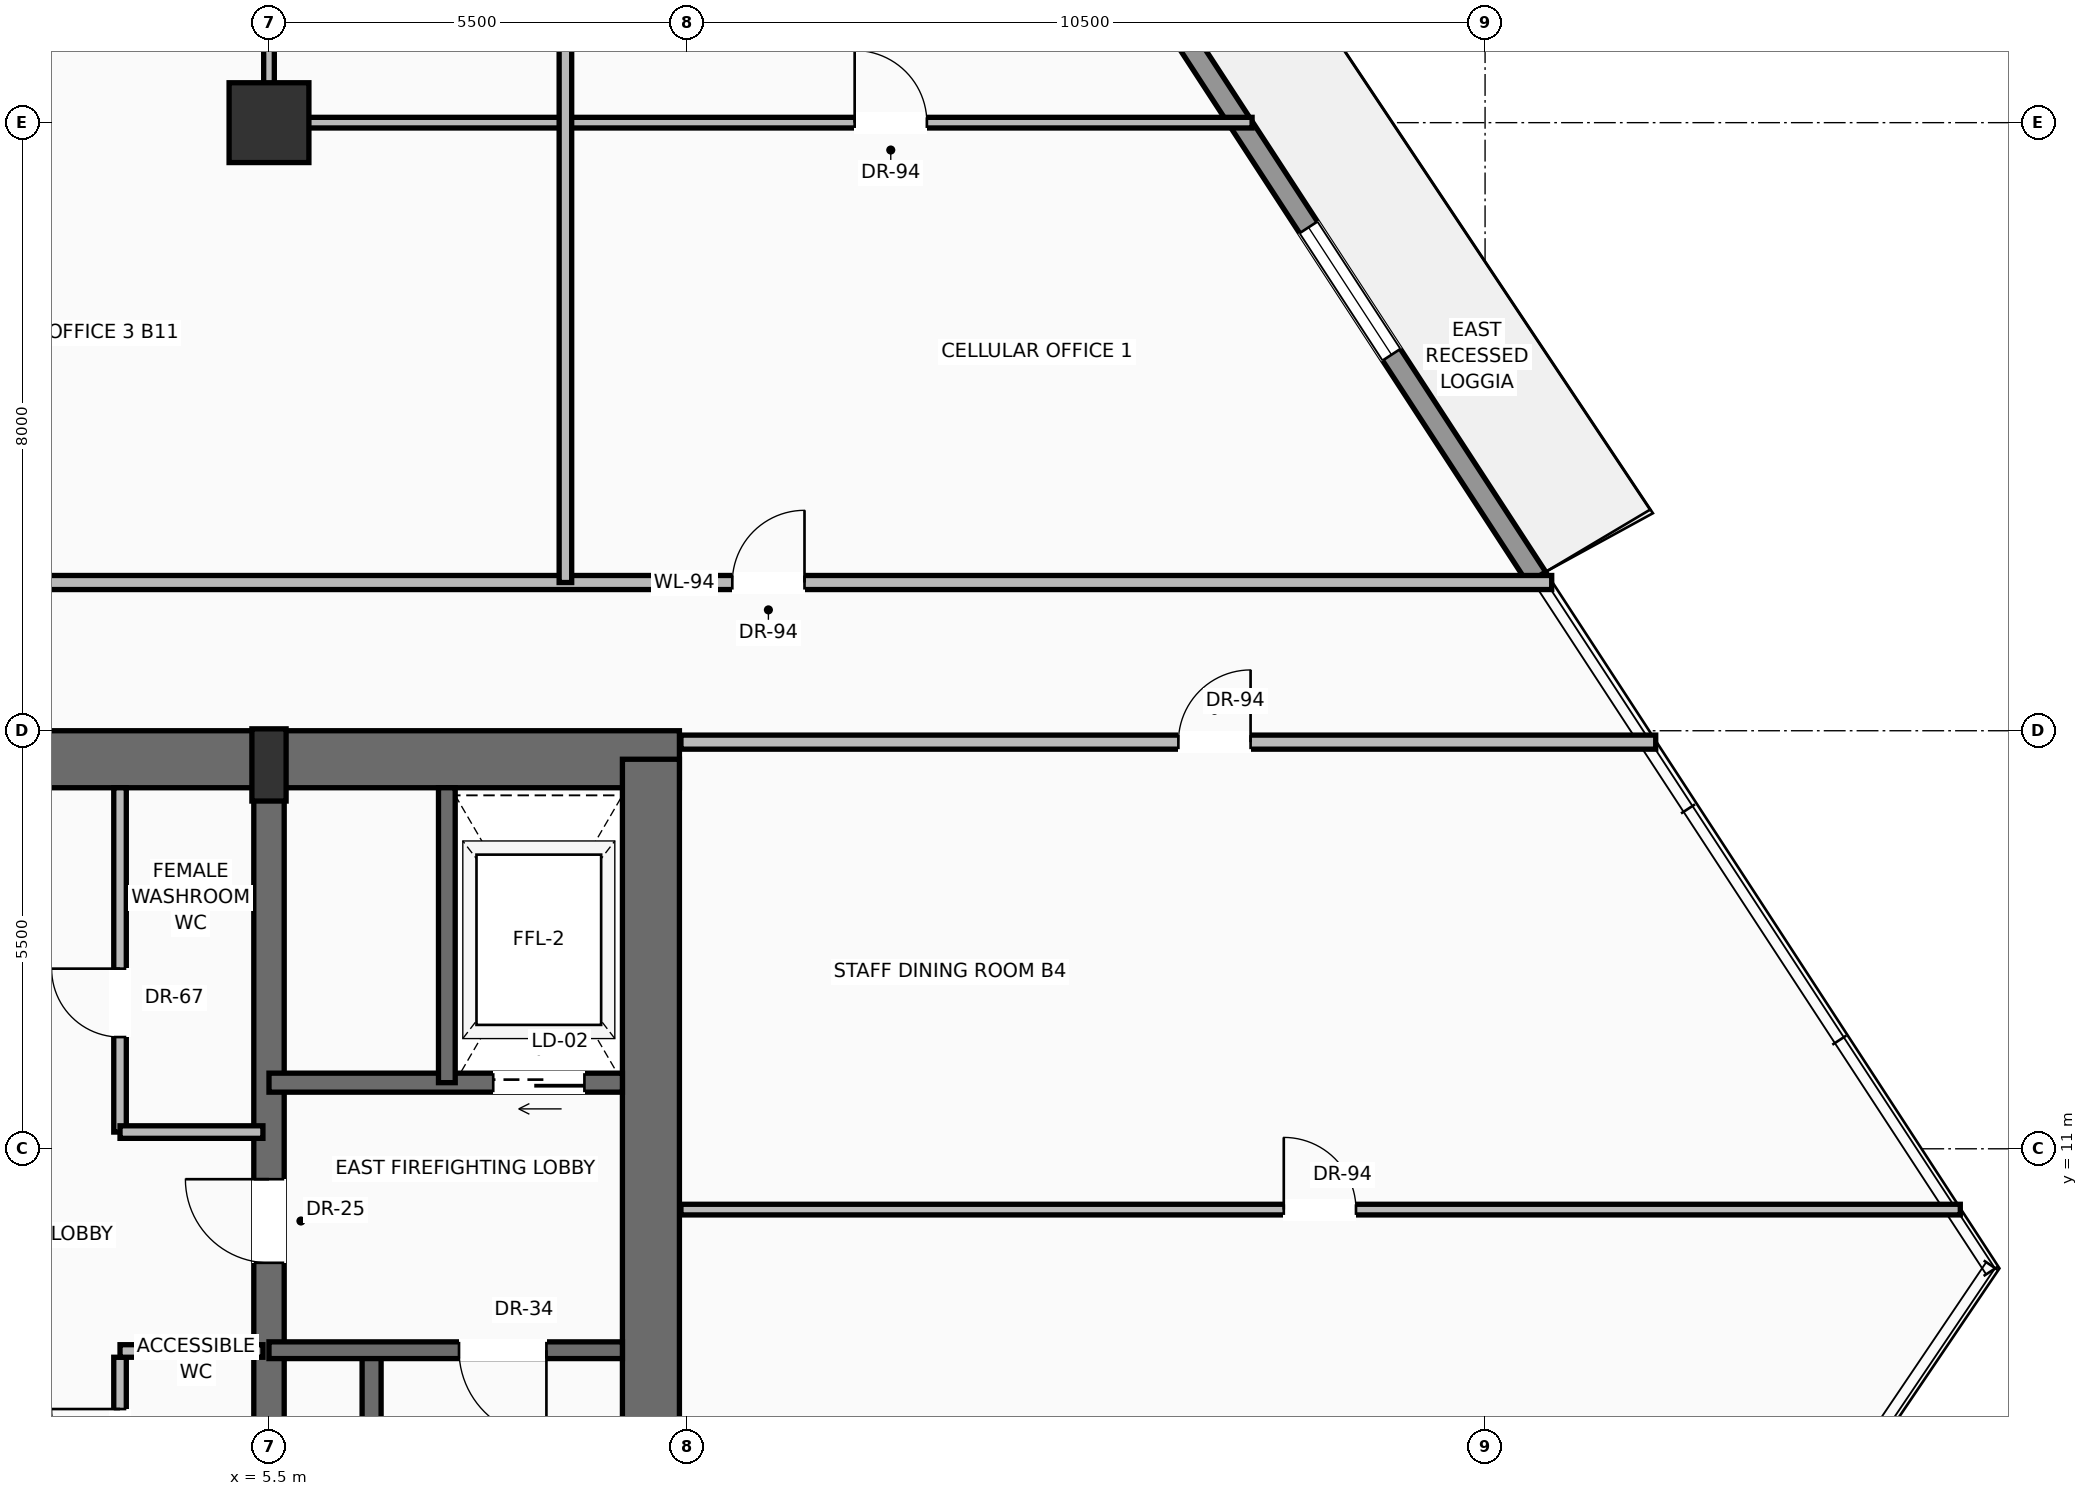
"""IFC4 building model, lengths in metres.
Left out: names, types, materials, properties, quantities, classifications, styles, units other than length and angle.
Written with IfcOpenShell. Run it as: python <this file> out.ifc"""

import sys

from ifc_helpers import new_model, si_unit, direction, frame, frame_2d, origin, origin_2d, place, context, subcontext, project, spatial, rectangle, extrude, source, transform, mapped, element, fill, save


model = new_model("IFC4")
c1 = context("Model", 3, precision=1e-05, world=origin(), true_north=direction((0.0, 1.0)))
c2 = subcontext(c1, "Body", "Model", "MODEL_VIEW")
j1 = project(units=[si_unit("LENGTHUNIT", "METRE"), si_unit("PLANEANGLEUNIT", "RADIAN")], contexts=[c1])
p1 = place(None, origin())
s1 = spatial("IfcSite", under=j1, at=p1, CompositionType="ELEMENT")
p2 = place(p1, origin())
s2 = spatial("IfcBuilding", under=s1, at=p2, CompositionType="ELEMENT")
p3 = place(p2, frame((0.0, 0.0, 84.0)))
s3 = spatial("IfcBuildingStorey", under=s2, at=p3, CompositionType="ELEMENT", Elevation=84.0)
p4 = place(p3, frame((-10.9, 16.125, 0.0), z_axis=(0.0, 0.0, 1.0), x_axis=(1.0, 0.0, 0.0)))
e1 = element("IfcWall", 1, at=p4, inside=s3, PredefinedType="SHEAR", context=c2, shape_type="SweptSolid", body=[
    extrude(rectangle(XDim=21.8, YDim=0.75, at=frame_2d((10.9, 0.0))), origin(), (0.0, 0.0, 1.0), 3.45),
])
p5 = place(p4, frame((3.47, 0.0, 0.0)))
e2 = element("IfcOpeningElement", 2, at=p5, cuts=e1, PredefinedType="OPENING", context=c2, shape_type="SweptSolid", body=[
    extrude(rectangle(XDim=1.3, YDim=2.3, at=frame_2d((0.65, 1.15))), frame((0.0, 0.385, 0.0), z_axis=(0.0, -1.0, 0.0), x_axis=(1.0, 0.0, 0.0)), (0.0, 0.0, 1.0), 0.77),
])
p6 = place(p4, frame((9.9, 0.0, 0.0)))
e3 = element("IfcOpeningElement", 3, at=p6, cuts=e1, PredefinedType="OPENING", context=c2, shape_type="SweptSolid", body=[
    extrude(rectangle(XDim=2.0, YDim=2.4, at=frame_2d((1.0, 1.2))), frame((0.0, 0.385, 0.0), z_axis=(0.0, -1.0, 0.0), x_axis=(1.0, 0.0, 0.0)), (0.0, 0.0, 1.0), 0.77),
])
p7 = place(p3, frame((10.525, 0.475, 0.0), z_axis=(0.0, 0.0, 1.0), x_axis=(0.0, 1.0, 0.0)))
e4 = element("IfcWall", 4, at=p7, inside=s3, PredefinedType="SHEAR", context=c2, shape_type="SweptSolid", body=[
    extrude(rectangle(XDim=15.65, YDim=0.75, at=frame_2d((7.825, 0.0))), origin(), (0.0, 0.0, 1.0), 3.45),
])
p8 = place(p3, frame((5.5, 0.475, 0.0), z_axis=(0.0, 0.0, 1.0), x_axis=(0.0, 1.0, 0.0)))
e5 = element("IfcWall", 5, at=p8, inside=s3, PredefinedType="SHEAR", context=c2, shape_type="SweptSolid", body=[
    extrude(rectangle(XDim=15.65, YDim=0.4, at=frame_2d((7.825, 0.0))), origin(), (0.0, 0.0, 1.0), 3.45),
])
p9 = place(p8, frame((9.025, 0.0, 0.0)))
e6 = element("IfcOpeningElement", 6, at=p9, cuts=e5, PredefinedType="OPENING", context=c2, shape_type="SweptSolid", body=[
    extrude(rectangle(XDim=1.1, YDim=2.2, at=frame_2d((0.55, 1.1))), frame((0.0, 0.21, 0.0), z_axis=(0.0, -1.0, 0.0), x_axis=(1.0, 0.0, 0.0)), (0.0, 0.0, 1.0), 0.42),
])
m1 = source(origin(), c2, "Body", "SweptSolid", [
    extrude(rectangle(XDim=0.45, YDim=0.95, at=origin_2d()), origin(), (0.0, 0.0, 1.0), 3.7),
])
p10 = place(p3, frame((5.5, 16.05, 0.0), z_axis=(0.0, 0.0, 1.0), x_axis=(1.0, 0.0, 0.0)))
e7 = element("IfcColumn", 7, at=p10, inside=s3, PredefinedType="PILASTER", context=c2, shape_type="MappedRepresentation", body=[
    mapped(m1, transform((0.0, 0.0, 0.0), scale=1.0)),
])
m2 = source(origin(), c2, "Body", "SweptSolid", [
    extrude(rectangle(XDim=1.05, YDim=1.05, at=origin_2d()), origin(), (0.0, 0.0, 1.0), 3.7),
])
p11 = place(p3, frame((5.5, 24.5, 0.0), z_axis=(0.0, 0.0, 1.0), x_axis=(1.0, 0.0, 0.0)))
e8 = element("IfcColumn", 8, at=p11, inside=s3, PredefinedType="COLUMN", context=c2, shape_type="MappedRepresentation", body=[
    mapped(m2, transform((0.0, 0.0, 0.0), scale=1.0)),
])
p12 = place(p3, frame((12.796, 32.914, 0.0), z_axis=(0.0, 0.0, 1.0), x_axis=(0.545943631237, -0.837821909186, 0.0)))
e9 = element("IfcWall", 9, at=p12, inside=s3, PredefinedType="SOLIDWALL", context=c2, shape_type="SweptSolid", body=[
    extrude(rectangle(XDim=17.187, YDim=0.28, at=frame_2d((8.594, 0.0))), origin(), (0.0, 0.0, 1.0), 3.03),
])
p13 = place(p12, frame((4.125, 0.0, 0.0)))
e10 = element("IfcOpeningElement", 10, at=p13, cuts=e9, PredefinedType="OPENING", context=c2, shape_type="SweptSolid", body=[
    extrude(rectangle(XDim=1.6, YDim=2.35, at=frame_2d((0.8, 1.175))), frame((0.0, 0.15, 0.0), z_axis=(0.0, -1.0, 0.0), x_axis=(1.0, 0.0, 0.0)), (0.0, 0.0, 1.0), 0.3),
])
p14 = place(p12, frame((11.688, 0.0, 0.9)))
e11 = element("IfcOpeningElement", 11, at=p14, cuts=e9, PredefinedType="OPENING", context=c2, shape_type="SweptSolid", body=[
    extrude(rectangle(XDim=2.0, YDim=1.85, at=frame_2d((1.0, 0.925))), frame((0.0, 0.15, 0.0), z_axis=(0.0, -1.0, 0.0), x_axis=(1.0, 0.0, 0.0)), (0.0, 0.0, 1.0), 0.3),
])
p15 = place(p3, frame((6.85, 0.85, 0.0), z_axis=(0.0, 0.0, 1.0), x_axis=(0.0, 1.0, 0.0)))
e12 = element("IfcWall", 12, at=p15, inside=s3, PredefinedType="SOLIDWALL", context=c2, shape_type="SweptSolid", body=[
    extrude(rectangle(XDim=7.5, YDim=0.25, at=frame_2d((3.75, 0.0))), origin(), (0.0, 0.0, 1.0), 3.45),
])
p16 = place(p3, frame((10.15, 8.35, 0.0), z_axis=(0.0, 0.0, 1.0), x_axis=(-1.0, 0.0, 0.0)))
e13 = element("IfcWall", 13, at=p16, inside=s3, PredefinedType="SOLIDWALL", context=c2, shape_type="SweptSolid", body=[
    extrude(rectangle(XDim=4.65, YDim=0.22, at=frame_2d((2.325, 0.0))), origin(), (0.0, 0.0, 1.0), 3.45),
])
p17 = place(p16, frame((1.0, 0.0, 0.0)))
e14 = element("IfcOpeningElement", 14, at=p17, cuts=e13, PredefinedType="OPENING", context=c2, shape_type="SweptSolid", body=[
    extrude(rectangle(XDim=1.15, YDim=2.2, at=frame_2d((0.575, 1.1))), frame((0.0, 0.12, 0.0), z_axis=(0.0, -1.0, 0.0), x_axis=(1.0, 0.0, 0.0)), (0.0, 0.0, 1.0), 0.24),
])
p18 = place(p3, frame((10.15, 11.87, 0.0), z_axis=(0.0, 0.0, 1.0), x_axis=(-1.0, 0.0, 0.0)))
e15 = element("IfcWall", 15, at=p18, inside=s3, PredefinedType="SOLIDWALL", context=c2, shape_type="SweptSolid", body=[
    extrude(rectangle(XDim=4.65, YDim=0.25, at=frame_2d((2.325, 0.0))), origin(), (0.0, 0.0, 1.0), 3.45),
])
p19 = place(p18, frame((0.5, 0.0, 0.0)))
e16 = element("IfcOpeningElement", 16, at=p19, cuts=e15, PredefinedType="OPENING", context=c2, shape_type="SweptSolid", body=[
    extrude(rectangle(XDim=1.2, YDim=2.25, at=frame_2d((0.6, 1.125))), frame((0.0, 0.135, 0.0), z_axis=(0.0, -1.0, 0.0), x_axis=(1.0, 0.0, 0.0)), (0.0, 0.0, 1.0), 0.27),
])
p20 = place(p3, frame((7.84, 11.87, 0.0), z_axis=(0.0, 0.0, 1.0), x_axis=(0.0, 1.0, 0.0)))
e17 = element("IfcWall", 17, at=p20, inside=s3, PredefinedType="SOLIDWALL", context=c2, shape_type="SweptSolid", body=[
    extrude(rectangle(XDim=3.88, YDim=0.22, at=frame_2d((1.94, 0.0))), origin(), (0.0, 0.0, 1.0), 3.45),
])
p21 = place(p3, frame((3.54, 5.383, 0.0), z_axis=(0.0, 0.0, 1.0), x_axis=(0.0, 1.0, 0.0)))
e18 = element("IfcWall", 18, at=p21, inside=s3, PredefinedType="PARTITIONING", context=c2, shape_type="SweptSolid", body=[
    extrude(rectangle(XDim=2.875, YDim=0.165, at=frame_2d((1.438, 0.0))), origin(), (0.0, 0.0, 1.0), 3.442),
])
p22 = place(p21, frame((1.294, 0.0, 0.0)))
e19 = element("IfcOpeningElement", 19, at=p22, cuts=e18, PredefinedType="OPENING", context=c2, shape_type="SweptSolid", body=[
    extrude(rectangle(XDim=0.9, YDim=2.1, at=frame_2d((0.45, 1.05))), frame((0.0, 0.093, 0.0), z_axis=(0.0, -1.0, 0.0), x_axis=(1.0, 0.0, 0.0)), (0.0, 0.0, 1.0), 0.185),
])
p23 = place(p3, frame((3.54, 8.34, 0.0), z_axis=(0.0, 0.0, 1.0), x_axis=(1.0, 0.0, 0.0)))
e20 = element("IfcWall", 20, at=p23, inside=s3, PredefinedType="PARTITIONING", context=c2, shape_type="SweptSolid", body=[
    extrude(rectangle(XDim=1.88, YDim=0.165, at=frame_2d((0.94, 0.0))), origin(), (0.0, 0.0, 1.0), 3.442),
])
p24 = place(p3, frame((3.54, 11.22, 0.0), z_axis=(0.0, 0.0, 1.0), x_axis=(0.0, 1.0, 0.0)))
e21 = element("IfcWall", 21, at=p24, inside=s3, PredefinedType="PARTITIONING", context=c2, shape_type="SweptSolid", body=[
    extrude(rectangle(XDim=4.53, YDim=0.165, at=frame_2d((2.265, 0.0))), origin(), (0.0, 0.0, 1.0), 3.442),
])
p25 = place(p24, frame((1.25, 0.0, 0.0)))
e22 = element("IfcOpeningElement", 22, at=p25, cuts=e21, PredefinedType="OPENING", context=c2, shape_type="SweptSolid", body=[
    extrude(rectangle(XDim=0.9, YDim=2.1, at=frame_2d((0.45, 1.05))), frame((0.0, 0.093, 0.0), z_axis=(0.0, -1.0, 0.0), x_axis=(1.0, 0.0, 0.0)), (0.0, 0.0, 1.0), 0.185),
])
p26 = place(p3, frame((3.54, 11.22, 0.0), z_axis=(0.0, 0.0, 1.0), x_axis=(1.0, 0.0, 0.0)))
e23 = element("IfcWall", 23, at=p26, inside=s3, PredefinedType="PARTITIONING", context=c2, shape_type="SweptSolid", body=[
    extrude(rectangle(XDim=1.88, YDim=0.165, at=frame_2d((0.94, 0.0))), origin(), (0.0, 0.0, 1.0), 3.442),
])
p27 = place(p3, frame((10.92, 16.35, 0.0), z_axis=(0.0, 0.0, 1.0), x_axis=(1.0, 0.0, 0.0)))
e24 = element("IfcWall", 24, at=p27, inside=s3, PredefinedType="PARTITIONING", context=c2, shape_type="SweptSolid", body=[
    extrude(rectangle(XDim=12.825, YDim=0.185, at=frame_2d((6.413, 0.0))), origin(), (0.0, 0.0, 1.0), 2.747),
])
p28 = place(p27, frame((6.545, 0.0, 0.0)))
e25 = element("IfcOpeningElement", 25, at=p28, cuts=e24, PredefinedType="OPENING", context=c2, shape_type="SweptSolid", body=[
    extrude(rectangle(XDim=0.95, YDim=2.2, at=frame_2d((0.475, 1.1))), frame((0.0, 0.103, 0.0), z_axis=(0.0, -1.0, 0.0), x_axis=(1.0, 0.0, 0.0)), (0.0, 0.0, 1.0), 0.205),
])
p29 = place(p3, frame((-0.45, 18.45, 0.0), z_axis=(0.0, 0.0, 1.0), x_axis=(1.0, 0.0, 0.0)))
e26 = element("IfcWall", 26, at=p29, inside=s3, PredefinedType="PARTITIONING", context=c2, shape_type="SweptSolid", body=[
    extrude(rectangle(XDim=22.827, YDim=0.185, at=frame_2d((11.413, 0.0))), origin(), (0.0, 0.0, 1.0), 2.747),
])
p30 = place(p29, frame((12.046, 0.0, 0.0)))
e27 = element("IfcOpeningElement", 27, at=p30, cuts=e26, PredefinedType="OPENING", context=c2, shape_type="SweptSolid", body=[
    extrude(rectangle(XDim=0.95, YDim=2.2, at=frame_2d((0.475, 1.1))), frame((0.0, 0.103, 0.0), z_axis=(0.0, -1.0, 0.0), x_axis=(1.0, 0.0, 0.0)), (0.0, 0.0, 1.0), 0.205),
])
p31 = place(p3, frame((5.5, 24.5, 0.0), z_axis=(0.0, 0.0, 1.0), x_axis=(0.0, 1.0, 0.0)))
e28 = element("IfcWall", 28, at=p31, inside=s3, PredefinedType="PARTITIONING", context=c2, shape_type="SweptSolid", body=[
    extrude(rectangle(XDim=17.645, YDim=0.14, at=frame_2d((8.822, 0.0))), origin(), (0.0, 0.0, 1.0), 2.747),
])
p32 = place(p31, frame((3.23, 0.0, 0.0)))
e29 = element("IfcOpeningElement", 29, at=p32, cuts=e28, PredefinedType="OPENING", context=c2, shape_type="SweptSolid", body=[
    extrude(rectangle(XDim=0.95, YDim=2.2, at=frame_2d((0.475, 1.1))), frame((0.0, 0.08, 0.0), z_axis=(0.0, -1.0, 0.0), x_axis=(1.0, 0.0, 0.0)), (0.0, 0.0, 1.0), 0.16),
])
p33 = place(p31, frame((11.812, 0.0, 0.0)))
e30 = element("IfcOpeningElement", 30, at=p33, cuts=e28, PredefinedType="OPENING", context=c2, shape_type="SweptSolid", body=[
    extrude(rectangle(XDim=0.95, YDim=2.2, at=frame_2d((0.475, 1.1))), frame((0.0, 0.08, 0.0), z_axis=(0.0, -1.0, 0.0), x_axis=(1.0, 0.0, 0.0)), (0.0, 0.0, 1.0), 0.16),
])
p34 = place(p3, frame((5.5, 24.5, 0.0), z_axis=(0.0, 0.0, 1.0), x_axis=(1.0, 0.0, 0.0)))
e31 = element("IfcWall", 31, at=p34, inside=s3, PredefinedType="PARTITIONING", context=c2, shape_type="SweptSolid", body=[
    extrude(rectangle(XDim=12.935, YDim=0.14, at=frame_2d((6.467, 0.0))), origin(), (0.0, 0.0, 1.0), 2.747),
])
p35 = place(p34, frame((7.706, 0.0, 0.0)))
e32 = element("IfcOpeningElement", 32, at=p35, cuts=e31, PredefinedType="OPENING", context=c2, shape_type="SweptSolid", body=[
    extrude(rectangle(XDim=0.95, YDim=2.2, at=frame_2d((0.475, 1.1))), frame((0.0, 0.08, 0.0), z_axis=(0.0, -1.0, 0.0), x_axis=(1.0, 0.0, 0.0)), (0.0, 0.0, 1.0), 0.16),
])
p36 = place(p3, frame((9.4, 18.45, 0.0), z_axis=(0.0, 0.0, 1.0), x_axis=(0.0, 1.0, 0.0)))
e33 = element("IfcWall", 33, at=p36, inside=s3, PredefinedType="PARTITIONING", context=c2, shape_type="SweptSolid", body=[
    extrude(rectangle(XDim=17.55, YDim=0.165, at=frame_2d((8.775, 0.0))), origin(), (0.0, 0.0, 1.0), 2.747),
])
p37 = place(p3, frame((10.92, 10.2, 0.0), z_axis=(0.0, 0.0, 1.0), x_axis=(1.0, 0.0, 0.0)))
e34 = element("IfcWall", 34, at=p37, inside=s3, PredefinedType="PARTITIONING", context=c2, shape_type="SweptSolid", body=[
    extrude(rectangle(XDim=16.833, YDim=0.14, at=frame_2d((8.416, 0.0))), origin(), (0.0, 0.0, 1.0), 3.442),
])
p38 = place(p37, frame((7.932, 0.0, 0.0)))
e35 = element("IfcOpeningElement", 35, at=p38, cuts=e34, PredefinedType="OPENING", context=c2, shape_type="SweptSolid", body=[
    extrude(rectangle(XDim=0.95, YDim=2.2, at=frame_2d((0.475, 1.1))), frame((0.0, 0.08, 0.0), z_axis=(0.0, -1.0, 0.0), x_axis=(1.0, 0.0, 0.0)), (0.0, 0.0, 1.0), 0.16),
])
m3 = source(origin(), c2, "Body", "SweptSolid", [
    extrude(rectangle(XDim=2.0, YDim=1.85, at=frame_2d((1.0, 0.925))), frame((0.0, 0.03, 0.0), z_axis=(0.0, -1.0, 0.0), x_axis=(1.0, 0.0, 0.0)), (0.0, 0.0, 1.0), 0.06),
])
p39 = place(p14, origin())
e36 = element("IfcWindow", 36, at=p39, inside=s3, PartitioningType="SINGLE_PANEL", PredefinedType="WINDOW", context=c2, shape_type="MappedRepresentation", body=[
    mapped(m3, transform((0.0, 0.0, 0.0), scale=1.0)),
])
fill(e11, e36)
m4 = source(origin(), c2, "Body", "SweptSolid", [
    extrude(rectangle(XDim=1.15, YDim=2.2, at=frame_2d((0.575, 1.1))), frame((0.0, 0.025, 0.0), z_axis=(0.0, -1.0, 0.0), x_axis=(1.0, 0.0, 0.0)), (0.0, 0.0, 1.0), 0.05),
])
p40 = place(p17, origin())
e37 = element("IfcDoor", 37, at=p40, inside=s3, OperationType="SINGLE_SWING_LEFT", PredefinedType="DOOR", context=c2, shape_type="MappedRepresentation", body=[
    mapped(m4, transform((0.0, 0.0, 0.0), scale=1.0)),
])
fill(e14, e37)
m5 = source(origin(), c2, "Body", "SweptSolid", [
    extrude(rectangle(XDim=1.1, YDim=2.2, at=frame_2d((0.55, 1.1))), frame((0.0, 0.025, 0.0), z_axis=(0.0, -1.0, 0.0), x_axis=(1.0, 0.0, 0.0)), (0.0, 0.0, 1.0), 0.05),
])
p41 = place(p9, origin())
e38 = element("IfcDoor", 38, at=p41, inside=s3, OperationType="SINGLE_SWING_RIGHT", PredefinedType="DOOR", context=c2, shape_type="MappedRepresentation", body=[
    mapped(m5, transform((0.0, 0.0, 0.0), scale=1.0)),
])
fill(e6, e38)
m6 = source(origin(), c2, "Body", "SweptSolid", [
    extrude(rectangle(XDim=1.2, YDim=2.25, at=frame_2d((0.6, 1.125))), frame((0.0, 0.025, 0.0), z_axis=(0.0, -1.0, 0.0), x_axis=(1.0, 0.0, 0.0)), (0.0, 0.0, 1.0), 0.05),
])
p42 = place(p19, origin())
e39 = element("IfcDoor", 39, at=p42, inside=s3, OperationType="SLIDING_TO_RIGHT", PredefinedType="DOOR", context=c2, shape_type="MappedRepresentation", body=[
    mapped(m6, transform((0.0, 0.0, 0.0), scale=1.0)),
])
fill(e16, e39)
m7 = source(origin(), c2, "Body", "SweptSolid", [
    extrude(rectangle(XDim=0.9, YDim=2.1, at=frame_2d((0.45, 1.05))), frame((0.0, 0.025, 0.0), z_axis=(0.0, -1.0, 0.0), x_axis=(1.0, 0.0, 0.0)), (0.0, 0.0, 1.0), 0.05),
])
p43 = place(p22, origin())
e40 = element("IfcDoor", 40, at=p43, inside=s3, OperationType="SINGLE_SWING_RIGHT", PredefinedType="DOOR", context=c2, shape_type="MappedRepresentation", body=[
    mapped(m7, transform((0.0, 0.0, 0.0), scale=1.0)),
])
fill(e19, e40)
p44 = place(p25, origin())
e41 = element("IfcDoor", 41, at=p44, inside=s3, OperationType="SINGLE_SWING_RIGHT", PredefinedType="DOOR", context=c2, shape_type="MappedRepresentation", body=[
    mapped(m7, transform((0.0, 0.0, 0.0), scale=1.0)),
])
fill(e22, e41)
m8 = source(origin(), c2, "Body", "SweptSolid", [
    extrude(rectangle(XDim=0.95, YDim=2.2, at=frame_2d((0.475, 1.1))), frame((0.0, 0.025, 0.0), z_axis=(0.0, -1.0, 0.0), x_axis=(1.0, 0.0, 0.0)), (0.0, 0.0, 1.0), 0.05),
])
p45 = place(p28, origin())
e42 = element("IfcDoor", 42, at=p45, inside=s3, OperationType="SINGLE_SWING_RIGHT", PredefinedType="DOOR", context=c2, shape_type="MappedRepresentation", body=[
    mapped(m8, transform((0.0, 0.0, 0.0), scale=1.0)),
])
fill(e25, e42)
p46 = place(p30, origin())
e43 = element("IfcDoor", 43, at=p46, inside=s3, OperationType="SINGLE_SWING_RIGHT", PredefinedType="DOOR", context=c2, shape_type="MappedRepresentation", body=[
    mapped(m8, transform((0.0, 0.0, 0.0), scale=1.0)),
])
fill(e27, e43)
p47 = place(p38, origin())
e44 = element("IfcDoor", 44, at=p47, inside=s3, OperationType="SINGLE_SWING_LEFT", PredefinedType="DOOR", context=c2, shape_type="MappedRepresentation", body=[
    mapped(m8, transform((0.0, 0.0, 0.0), scale=1.0)),
])
fill(e35, e44)
p48 = place(p35, origin())
e45 = element("IfcDoor", 45, at=p48, inside=s3, OperationType="SINGLE_SWING_LEFT", PredefinedType="DOOR", context=c2, shape_type="MappedRepresentation", body=[
    mapped(m8, transform((0.0, 0.0, 0.0), scale=1.0)),
])
fill(e32, e45)
save(model, sys.argv[1])
